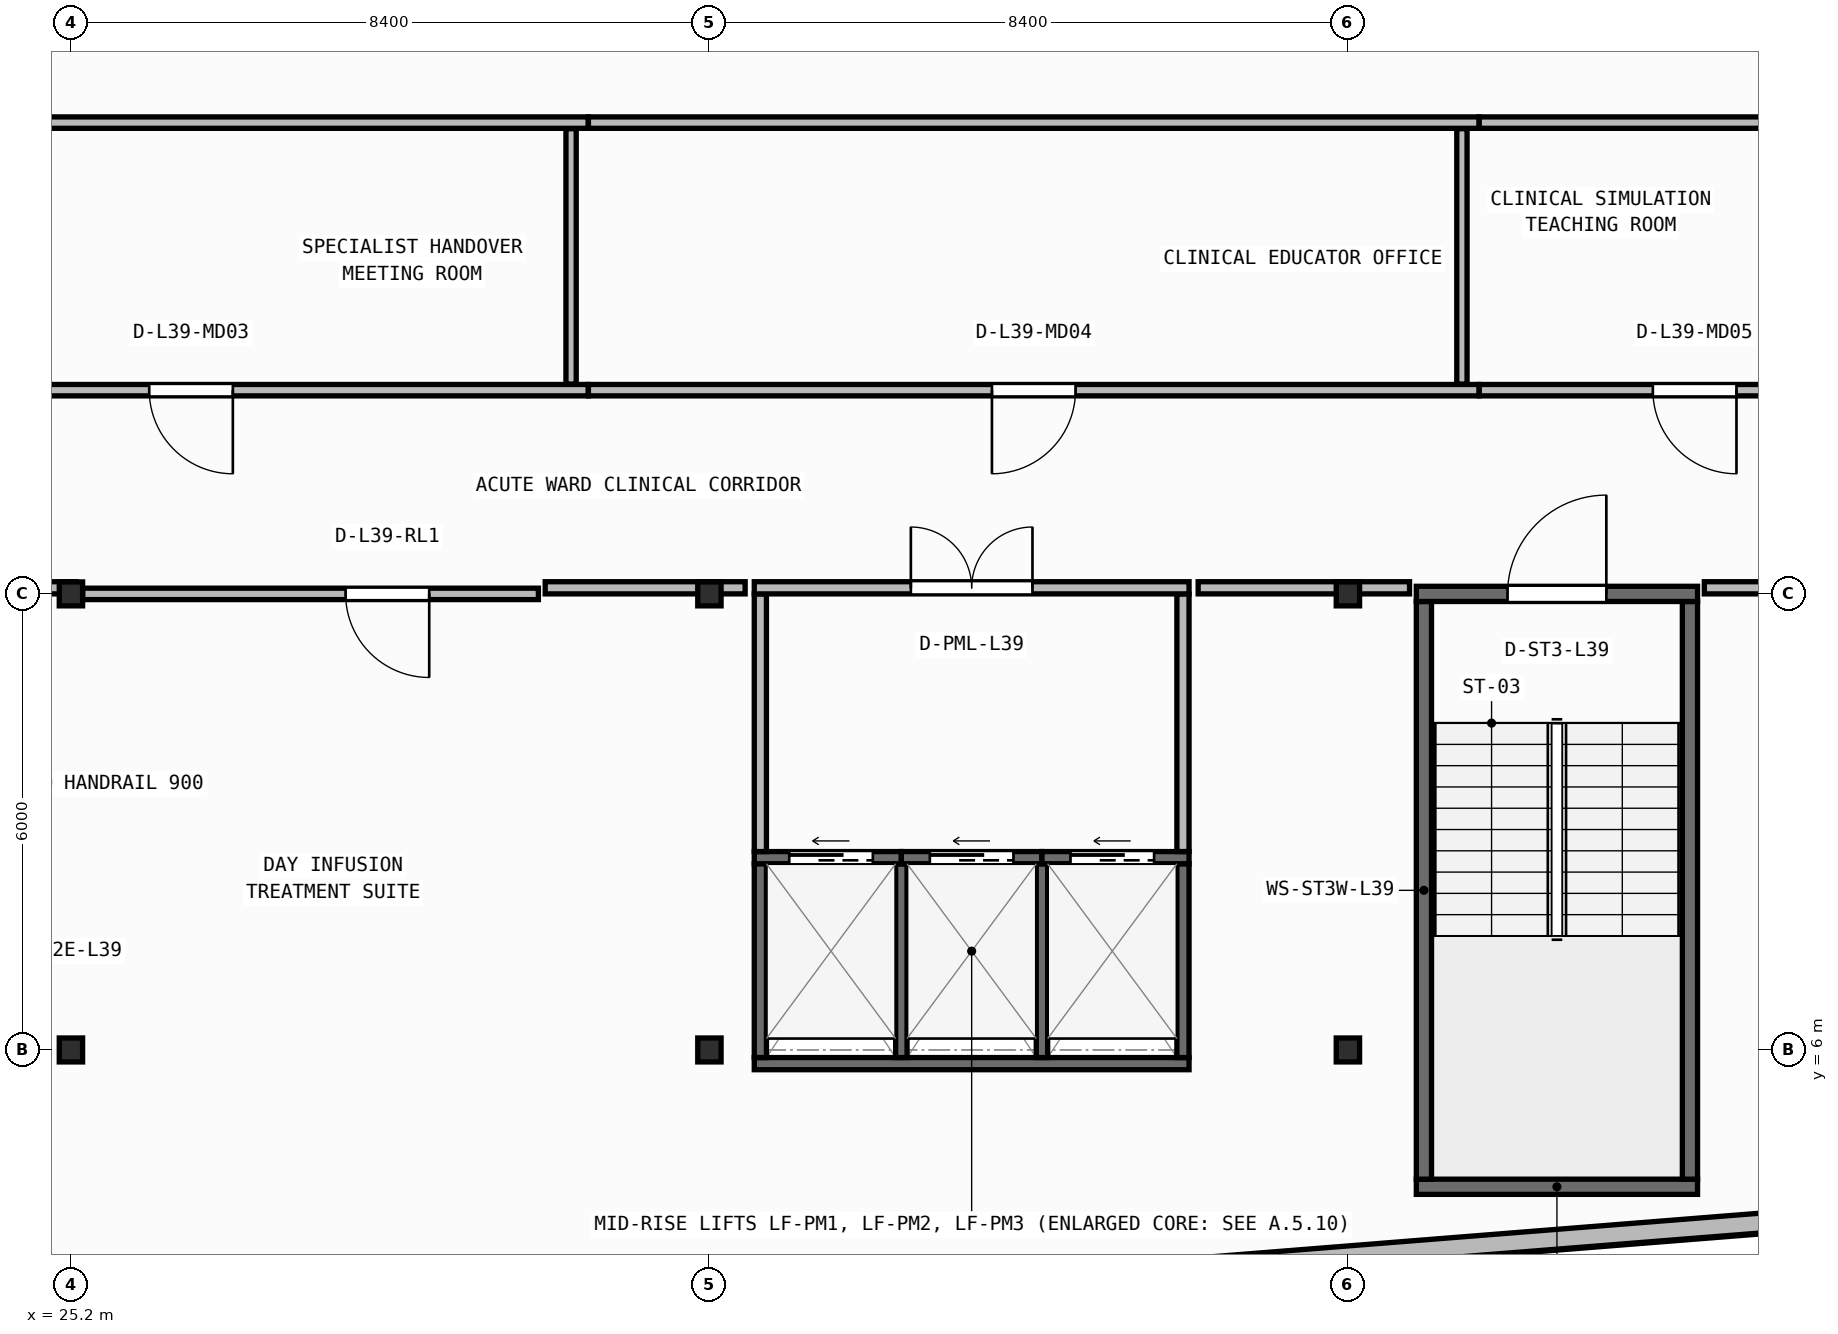
"""IFC4 building model, lengths in metres.
Left out: names, types, materials, properties, quantities, classifications, styles, units other than length and angle.
Written with IfcOpenShell. Run it as: python <this file> out.ifc"""

import sys

from ifc_helpers import new_model, si_unit, direction, frame, frame_2d, origin, origin_2d, place, context, subcontext, project, spatial, rectangle, i_section, extrude, element, fill, save


model = new_model("IFC4")
c1 = context("Model", 3, precision=1e-05, world=origin(), true_north=direction((0.0, 1.0)))
c2 = subcontext(c1, "Body", "Model", "MODEL_VIEW")
j1 = project(units=[si_unit("LENGTHUNIT", "METRE"), si_unit("PLANEANGLEUNIT", "RADIAN")], contexts=[c1])
p1 = place(None, origin())
s1 = spatial("IfcSite", under=j1, at=p1, CompositionType="ELEMENT")
p2 = place(p1, origin())
s2 = spatial("IfcBuilding", under=s1, at=p2, CompositionType="ELEMENT")
p3 = place(p2, frame((0.0, 0.0, 158.65)))
s3 = spatial("IfcBuildingStorey", under=s2, at=p3, CompositionType="ELEMENT", Elevation=158.65)
for number, where, z_axis, x_axis in (
    (1, (25.2, 6.0, 0.0), (0.0, 0.0, 1.0), (1.0, 0.0, 0.0)),
    (2, (33.6, 6.0, 0.0), (0.0, 0.0, 1.0), (1.0, 0.0, 0.0)),
    (3, (42.0, 6.0, 0.0), (0.0, 0.0, 1.0), (1.0, 0.0, 0.0)),
    (4, (25.2, 12.0, 0.0), (0.0, 0.0, 1.0), (1.0, 0.0, 0.0)),
    (5, (33.6, 12.0, 0.0), (0.0, 0.0, 1.0), (1.0, 0.0, 0.0)),
    (6, (42.0, 12.0, 0.0), (0.0, 0.0, 1.0), (1.0, 0.0, 0.0)),
):
    element("IfcColumn", number, at=place(p3, frame(where, z_axis=z_axis, x_axis=x_axis)), inside=s3, PredefinedType="COLUMN", context=c2, shape_type="SweptSolid", body=[
        extrude(i_section(OverallWidth=0.307, OverallDepth=0.315, WebThickness=0.012, FlangeThickness=0.019, FilletRadius=0.017, at=origin_2d()), origin(), (0.0, 0.0, 1.0), 3.95),
    ])
p4 = place(p3, frame((2.76, 0.173, 0.0), z_axis=(0.0, 0.0, 1.0), x_axis=(0.996857931723, 0.079210251617, 0.0)))
e7 = element("IfcWall", 7, at=p4, inside=s3, PredefinedType="STANDARD", context=c2, shape_type="SweptSolid", body=[
    extrude(rectangle(XDim=51.442, YDim=0.26, at=frame_2d((25.721, 0.0))), origin(), (0.0, 0.0, 1.0), 3.71),
])
p5 = place(p4, frame((24.521, 0.0, 0.9)))
e8 = element("IfcOpeningElement", 8, at=p5, cuts=e7, PredefinedType="OPENING", context=c2, shape_type="SweptSolid", body=[
    extrude(rectangle(XDim=2.4, YDim=1.65, at=frame_2d((1.2, 0.825))), frame((0.0, 0.14, 0.0), z_axis=(0.0, -1.0, 0.0), x_axis=(1.0, 0.0, 0.0)), (0.0, 0.0, 1.0), 0.28),
])
p6 = place(p3, frame((42.9, 4.2, 0.0), z_axis=(0.0, 0.0, 1.0), x_axis=(1.0, 0.0, 0.0)))
e9 = element("IfcWall", 9, at=p6, inside=s3, PredefinedType="SHEAR", context=c2, shape_type="SweptSolid", body=[
    extrude(rectangle(XDim=3.7, YDim=0.2, at=frame_2d((1.85, 0.0))), origin(), (0.0, 0.0, 1.0), 3.71),
])
for number, where, z_axis, x_axis in (
    (10, (43.0, 4.3, 0.0), (0.0, 0.0, 1.0), (0.0, 1.0, 0.0)),
    (11, (46.5, 4.3, 0.0), (0.0, 0.0, 1.0), (0.0, 1.0, 0.0)),
):
    element("IfcWall", number, at=place(p3, frame(where, z_axis=z_axis, x_axis=x_axis)), inside=s3, PredefinedType="SHEAR", context=c2, shape_type="SweptSolid", body=[
        extrude(rectangle(XDim=7.6, YDim=0.2, at=frame_2d((3.8, 0.0))), origin(), (0.0, 0.0, 1.0), 3.71),
    ])
p7 = place(p3, frame((42.9, 12.0, 0.0), z_axis=(0.0, 0.0, 1.0), x_axis=(1.0, 0.0, 0.0)))
e12 = element("IfcWall", 12, at=p7, inside=s3, PredefinedType="SHEAR", context=c2, shape_type="SweptSolid", body=[
    extrude(rectangle(XDim=3.7, YDim=0.2, at=frame_2d((1.85, 0.0))), origin(), (0.0, 0.0, 1.0), 3.71),
])
p8 = place(p7, frame((1.2, 0.0, 0.0)))
e13 = element("IfcOpeningElement", 13, at=p8, cuts=e12, PredefinedType="OPENING", context=c2, shape_type="SweptSolid", body=[
    extrude(rectangle(XDim=1.3, YDim=2.15, at=frame_2d((0.65, 1.075))), frame((0.0, 0.11, 0.0), z_axis=(0.0, -1.0, 0.0), x_axis=(1.0, 0.0, 0.0)), (0.0, 0.0, 1.0), 0.22),
])
p9 = place(p3, frame((34.19, 5.82, 0.0), z_axis=(0.0, 0.0, 1.0), x_axis=(1.0, 0.0, 0.0)))
e14 = element("IfcWall", 14, at=p9, inside=s3, PredefinedType="SHEAR", context=c2, shape_type="SweptSolid", body=[
    extrude(rectangle(XDim=5.72, YDim=0.16, at=frame_2d((2.86, 0.0))), origin(), (0.0, 0.0, 1.0), 3.71),
])
for number, where, z_axis, x_axis in (
    (15, (34.27, 5.9, 0.0), (0.0, 0.0, 1.0), (0.0, 1.0, 0.0)),
    (16, (39.83, 5.9, 0.0), (0.0, 0.0, 1.0), (0.0, 1.0, 0.0)),
):
    element("IfcWall", number, at=place(p3, frame(where, z_axis=z_axis, x_axis=x_axis)), inside=s3, PredefinedType="SHEAR", context=c2, shape_type="SweptSolid", body=[
        extrude(rectangle(XDim=2.55, YDim=0.16, at=frame_2d((1.275, 0.0))), origin(), (0.0, 0.0, 1.0), 3.71),
    ])
for number, where, z_axis, x_axis in (
    (17, (36.125, 5.9, 0.0), (0.0, 0.0, 1.0), (0.0, 1.0, 0.0)),
    (18, (37.975, 5.9, 0.0), (0.0, 0.0, 1.0), (0.0, 1.0, 0.0)),
):
    element("IfcWall", number, at=place(p3, frame(where, z_axis=z_axis, x_axis=x_axis)), inside=s3, PredefinedType="SHEAR", context=c2, shape_type="SweptSolid", body=[
        extrude(rectangle(XDim=2.55, YDim=0.15, at=frame_2d((1.275, 0.0))), origin(), (0.0, 0.0, 1.0), 3.71),
    ])
p10 = place(p3, frame((34.19, 8.53, 0.0), z_axis=(0.0, 0.0, 1.0), x_axis=(1.0, 0.0, 0.0)))
e19 = element("IfcWall", 19, at=p10, inside=s3, PredefinedType="SHEAR", context=c2, shape_type="SweptSolid", body=[
    extrude(rectangle(XDim=1.935, YDim=0.16, at=frame_2d((0.968, 0.0))), origin(), (0.0, 0.0, 1.0), 3.71),
])
p11 = place(p10, frame((0.46, 0.0, 0.0)))
e20 = element("IfcOpeningElement", 20, at=p11, cuts=e19, PredefinedType="OPENING", context=c2, shape_type="SweptSolid", body=[
    extrude(rectangle(XDim=1.1, YDim=2.15, at=frame_2d((0.55, 1.075))), frame((0.0, 0.09, 0.0), z_axis=(0.0, -1.0, 0.0), x_axis=(1.0, 0.0, 0.0)), (0.0, 0.0, 1.0), 0.18),
])
p12 = place(p3, frame((36.125, 8.53, 0.0), z_axis=(0.0, 0.0, 1.0), x_axis=(1.0, 0.0, 0.0)))
e21 = element("IfcWall", 21, at=p12, inside=s3, PredefinedType="SHEAR", context=c2, shape_type="SweptSolid", body=[
    extrude(rectangle(XDim=1.85, YDim=0.16, at=frame_2d((0.925, 0.0))), origin(), (0.0, 0.0, 1.0), 3.71),
])
p13 = place(p12, frame((0.375, 0.0, 0.0)))
e22 = element("IfcOpeningElement", 22, at=p13, cuts=e21, PredefinedType="OPENING", context=c2, shape_type="SweptSolid", body=[
    extrude(rectangle(XDim=1.1, YDim=2.15, at=frame_2d((0.55, 1.075))), frame((0.0, 0.09, 0.0), z_axis=(0.0, -1.0, 0.0), x_axis=(1.0, 0.0, 0.0)), (0.0, 0.0, 1.0), 0.18),
])
p14 = place(p3, frame((37.975, 8.53, 0.0), z_axis=(0.0, 0.0, 1.0), x_axis=(1.0, 0.0, 0.0)))
e23 = element("IfcWall", 23, at=p14, inside=s3, PredefinedType="SHEAR", context=c2, shape_type="SweptSolid", body=[
    extrude(rectangle(XDim=1.935, YDim=0.16, at=frame_2d((0.967, 0.0))), origin(), (0.0, 0.0, 1.0), 3.71),
])
p15 = place(p14, frame((0.375, 0.0, 0.0)))
e24 = element("IfcOpeningElement", 24, at=p15, cuts=e23, PredefinedType="OPENING", context=c2, shape_type="SweptSolid", body=[
    extrude(rectangle(XDim=1.1, YDim=2.15, at=frame_2d((0.55, 1.075))), frame((0.0, 0.09, 0.0), z_axis=(0.0, -1.0, 0.0), x_axis=(1.0, 0.0, 0.0)), (0.0, 0.0, 1.0), 0.18),
])
for number, where, z_axis, x_axis in (
    (25, (34.27, 8.61, 0.0), (0.0, 0.0, 1.0), (0.0, 1.0, 0.0)),
    (26, (39.83, 8.61, 0.0), (0.0, 0.0, 1.0), (0.0, 1.0, 0.0)),
):
    element("IfcWall", number, at=place(p3, frame(where, z_axis=z_axis, x_axis=x_axis)), inside=s3, PredefinedType="PARTITIONING", context=c2, shape_type="SweptSolid", body=[
        extrude(rectangle(XDim=3.39, YDim=0.16, at=frame_2d((1.695, 0.0))), origin(), (0.0, 0.0, 1.0), 3.71),
    ])
p16 = place(p3, frame((34.19, 12.08, 0.0), z_axis=(0.0, 0.0, 1.0), x_axis=(1.0, 0.0, 0.0)))
e27 = element("IfcWall", 27, at=p16, inside=s3, PredefinedType="PARTITIONING", context=c2, shape_type="SweptSolid", body=[
    extrude(rectangle(XDim=5.72, YDim=0.16, at=frame_2d((2.86, 0.0))), origin(), (0.0, 0.0, 1.0), 3.083),
])
p17 = place(p16, frame((2.06, 0.0, 0.0)))
e28 = element("IfcOpeningElement", 28, at=p17, cuts=e27, PredefinedType="OPENING", context=c2, shape_type="SweptSolid", body=[
    extrude(rectangle(XDim=1.6, YDim=2.05, at=frame_2d((0.8, 1.025))), frame((0.0, 0.09, 0.0), z_axis=(0.0, -1.0, 0.0), x_axis=(1.0, 0.0, 0.0)), (0.0, 0.0, 1.0), 0.18),
])
p18 = place(p3, frame((31.35, 12.0, 0.0), z_axis=(0.0, 0.0, 1.0), x_axis=(-1.0, 0.0, 0.0)))
e29 = element("IfcWall", 29, at=p18, inside=s3, PredefinedType="PARTITIONING", context=c2, shape_type="SweptSolid", body=[
    extrude(rectangle(XDim=5.997, YDim=0.15, at=frame_2d((2.998, 0.0))), origin(), (0.0, 0.0, 1.0), 3.083),
])
p19 = place(p18, frame((1.437, 0.0, 0.0)))
e30 = element("IfcOpeningElement", 30, at=p19, cuts=e29, PredefinedType="OPENING", context=c2, shape_type="SweptSolid", body=[
    extrude(rectangle(XDim=1.1, YDim=2.1, at=frame_2d((0.55, 1.05))), frame((0.0, 0.085, 0.0), z_axis=(0.0, -1.0, 0.0), x_axis=(1.0, 0.0, 0.0)), (0.0, 0.0, 1.0), 0.17),
])
p20 = place(p3, frame((32.006, 14.68, 0.0), z_axis=(0.0, 0.0, 1.0), x_axis=(-1.0, 0.0, 0.0)))
e31 = element("IfcWall", 31, at=p20, inside=s3, PredefinedType="PARTITIONING", context=c2, shape_type="SweptSolid", body=[
    extrude(rectangle(XDim=10.452, YDim=0.15, at=frame_2d((5.226, 0.0))), origin(), (0.0, 0.0, 1.0), 3.71),
])
p21 = place(p20, frame((4.676, 0.0, 0.0)))
e32 = element("IfcOpeningElement", 32, at=p21, cuts=e31, PredefinedType="OPENING", context=c2, shape_type="SweptSolid", body=[
    extrude(rectangle(XDim=1.1, YDim=2.1, at=frame_2d((0.55, 1.05))), frame((0.0, 0.085, 0.0), z_axis=(0.0, -1.0, 0.0), x_axis=(1.0, 0.0, 0.0)), (0.0, 0.0, 1.0), 0.17),
])
p22 = place(p3, frame((43.726, 14.68, 0.0), z_axis=(0.0, 0.0, 1.0), x_axis=(-1.0, 0.0, 0.0)))
e33 = element("IfcWall", 33, at=p22, inside=s3, PredefinedType="PARTITIONING", context=c2, shape_type="SweptSolid", body=[
    extrude(rectangle(XDim=11.718, YDim=0.15, at=frame_2d((5.859, 0.0))), origin(), (0.0, 0.0, 1.0), 3.71),
])
p23 = place(p22, frame((5.309, 0.0, 0.0)))
e34 = element("IfcOpeningElement", 34, at=p23, cuts=e33, PredefinedType="OPENING", context=c2, shape_type="SweptSolid", body=[
    extrude(rectangle(XDim=1.1, YDim=2.1, at=frame_2d((0.55, 1.05))), frame((0.0, 0.085, 0.0), z_axis=(0.0, -1.0, 0.0), x_axis=(1.0, 0.0, 0.0)), (0.0, 0.0, 1.0), 0.17),
])
p24 = place(p3, frame((49.396, 14.68, 0.0), z_axis=(0.0, 0.0, 1.0), x_axis=(-1.0, 0.0, 0.0)))
e35 = element("IfcWall", 35, at=p24, inside=s3, PredefinedType="PARTITIONING", context=c2, shape_type="SweptSolid", body=[
    extrude(rectangle(XDim=5.668, YDim=0.15, at=frame_2d((2.834, 0.0))), origin(), (0.0, 0.0, 1.0), 3.71),
])
p25 = place(p24, frame((2.284, 0.0, 0.0)))
e36 = element("IfcOpeningElement", 36, at=p25, cuts=e35, PredefinedType="OPENING", context=c2, shape_type="SweptSolid", body=[
    extrude(rectangle(XDim=1.1, YDim=2.1, at=frame_2d((0.55, 1.05))), frame((0.0, 0.085, 0.0), z_axis=(0.0, -1.0, 0.0), x_axis=(1.0, 0.0, 0.0)), (0.0, 0.0, 1.0), 0.17),
])
p26 = place(p3, frame((21.72, 18.2, 0.0), z_axis=(0.0, 0.0, 1.0), x_axis=(1.0, 0.0, 0.0)))
e37 = element("IfcWall", 37, at=p26, inside=s3, PredefinedType="PARTITIONING", context=c2, shape_type="SweptSolid", body=[
    extrude(rectangle(XDim=10.286, YDim=0.15, at=frame_2d((5.143, 0.0))), origin(), (0.0, 0.0, 1.0), 3.71),
])
p27 = place(p3, frame((32.008, 18.2, 0.0), z_axis=(0.0, 0.0, 1.0), x_axis=(1.0, 0.0, 0.0)))
e38 = element("IfcWall", 38, at=p27, inside=s3, PredefinedType="PARTITIONING", context=c2, shape_type="SweptSolid", body=[
    extrude(rectangle(XDim=11.718, YDim=0.15, at=frame_2d((5.859, 0.0))), origin(), (0.0, 0.0, 1.0), 3.71),
])
p28 = place(p3, frame((43.728, 18.2, 0.0), z_axis=(0.0, 0.0, 1.0), x_axis=(1.0, 0.0, 0.0)))
e39 = element("IfcWall", 39, at=p28, inside=s3, PredefinedType="PARTITIONING", context=c2, shape_type="SweptSolid", body=[
    extrude(rectangle(XDim=5.668, YDim=0.15, at=frame_2d((2.834, 0.0))), origin(), (0.0, 0.0, 1.0), 3.71),
])
for number, where, z_axis, x_axis in (
    (40, (31.78, 14.76, 0.0), (0.0, 0.0, 1.0), (0.0, 1.0, 0.0)),
    (41, (43.5, 14.76, 0.0), (0.0, 0.0, 1.0), (0.0, 1.0, 0.0)),
):
    element("IfcWall", number, at=place(p3, frame(where, z_axis=z_axis, x_axis=x_axis)), inside=s3, PredefinedType="PARTITIONING", context=c2, shape_type="SweptSolid", body=[
        extrude(rectangle(XDim=3.36, YDim=0.135, at=frame_2d((1.68, 0.0))), origin(), (0.0, 0.0, 1.0), 3.71),
    ])
p29 = place(p3, frame((24.02, 12.08, 0.0), z_axis=(0.0, 0.0, 1.0), x_axis=(1.0, 0.0, 0.0)))
e42 = element("IfcWall", 42, at=p29, inside=s3, PredefinedType="PARTITIONING", context=c2, shape_type="SweptSolid", body=[
    extrude(rectangle(XDim=1.244, YDim=0.16, at=frame_2d((0.622, 0.0))), origin(), (0.0, 0.0, 1.0), 3.083),
])
p30 = place(p3, frame((31.439, 12.08, 0.0), z_axis=(0.0, 0.0, 1.0), x_axis=(1.0, 0.0, 0.0)))
e43 = element("IfcWall", 43, at=p30, inside=s3, PredefinedType="PARTITIONING", context=c2, shape_type="SweptSolid", body=[
    extrude(rectangle(XDim=2.631, YDim=0.16, at=frame_2d((1.315, 0.0))), origin(), (0.0, 0.0, 1.0), 3.083),
])
p31 = place(p3, frame((40.03, 12.08, 0.0), z_axis=(0.0, 0.0, 1.0), x_axis=(1.0, 0.0, 0.0)))
e44 = element("IfcWall", 44, at=p31, inside=s3, PredefinedType="PARTITIONING", context=c2, shape_type="SweptSolid", body=[
    extrude(rectangle(XDim=2.781, YDim=0.16, at=frame_2d((1.39, 0.0))), origin(), (0.0, 0.0, 1.0), 3.083),
])
p32 = place(p3, frame((46.689, 12.08, 0.0), z_axis=(0.0, 0.0, 1.0), x_axis=(1.0, 0.0, 0.0)))
e45 = element("IfcWall", 45, at=p32, inside=s3, PredefinedType="PARTITIONING", context=c2, shape_type="SweptSolid", body=[
    extrude(rectangle(XDim=3.011, YDim=0.16, at=frame_2d((1.505, 0.0))), origin(), (0.0, 0.0, 1.0), 3.083),
])
p33 = place(p8, origin())
e46 = element("IfcDoor", 46, at=p33, inside=s3, OperationType="SINGLE_SWING_RIGHT", PredefinedType="DOOR", context=c2, shape_type="SweptSolid", body=[
    extrude(rectangle(XDim=1.3, YDim=2.15, at=frame_2d((0.65, 1.075))), frame((0.0, 0.025, 0.0), z_axis=(0.0, -1.0, 0.0), x_axis=(1.0, 0.0, 0.0)), (0.0, 0.0, 1.0), 0.05),
])
fill(e13, e46)
p34 = place(p11, origin())
e47 = element("IfcDoor", 47, at=p34, inside=s3, OperationType="SLIDING_TO_LEFT", PredefinedType="DOOR", context=c2, shape_type="SweptSolid", body=[
    extrude(rectangle(XDim=1.1, YDim=2.15, at=frame_2d((0.55, 1.075))), frame((0.0, 0.025, 0.0), z_axis=(0.0, -1.0, 0.0), x_axis=(1.0, 0.0, 0.0)), (0.0, 0.0, 1.0), 0.05),
])
fill(e20, e47)
p35 = place(p13, origin())
e48 = element("IfcDoor", 48, at=p35, inside=s3, OperationType="SLIDING_TO_LEFT", PredefinedType="DOOR", context=c2, shape_type="SweptSolid", body=[
    extrude(rectangle(XDim=1.1, YDim=2.15, at=frame_2d((0.55, 1.075))), frame((0.0, 0.025, 0.0), z_axis=(0.0, -1.0, 0.0), x_axis=(1.0, 0.0, 0.0)), (0.0, 0.0, 1.0), 0.05),
])
fill(e22, e48)
p36 = place(p15, origin())
e49 = element("IfcDoor", 49, at=p36, inside=s3, OperationType="SLIDING_TO_LEFT", PredefinedType="DOOR", context=c2, shape_type="SweptSolid", body=[
    extrude(rectangle(XDim=1.1, YDim=2.15, at=frame_2d((0.55, 1.075))), frame((0.0, 0.025, 0.0), z_axis=(0.0, -1.0, 0.0), x_axis=(1.0, 0.0, 0.0)), (0.0, 0.0, 1.0), 0.05),
])
fill(e24, e49)
p37 = place(p17, origin())
e50 = element("IfcDoor", 50, at=p37, inside=s3, OperationType="DOUBLE_DOOR_SINGLE_SWING", PredefinedType="DOOR", context=c2, shape_type="SweptSolid", body=[
    extrude(rectangle(XDim=1.6, YDim=2.05, at=frame_2d((0.8, 1.025))), frame((0.0, 0.025, 0.0), z_axis=(0.0, -1.0, 0.0), x_axis=(1.0, 0.0, 0.0)), (0.0, 0.0, 1.0), 0.05),
])
fill(e28, e50)
p38 = place(p19, origin())
e51 = element("IfcDoor", 51, at=p38, inside=s3, OperationType="SINGLE_SWING_LEFT", PredefinedType="DOOR", context=c2, shape_type="SweptSolid", body=[
    extrude(rectangle(XDim=1.1, YDim=2.1, at=frame_2d((0.55, 1.05))), frame((0.0, 0.025, 0.0), z_axis=(0.0, -1.0, 0.0), x_axis=(1.0, 0.0, 0.0)), (0.0, 0.0, 1.0), 0.05),
])
fill(e30, e51)
p39 = place(p21, origin())
e52 = element("IfcDoor", 52, at=p39, inside=s3, OperationType="SINGLE_SWING_LEFT", PredefinedType="DOOR", context=c2, shape_type="SweptSolid", body=[
    extrude(rectangle(XDim=1.1, YDim=2.1, at=frame_2d((0.55, 1.05))), frame((0.0, 0.025, 0.0), z_axis=(0.0, -1.0, 0.0), x_axis=(1.0, 0.0, 0.0)), (0.0, 0.0, 1.0), 0.05),
])
fill(e32, e52)
p40 = place(p23, origin())
e53 = element("IfcDoor", 53, at=p40, inside=s3, OperationType="SINGLE_SWING_RIGHT", PredefinedType="DOOR", context=c2, shape_type="SweptSolid", body=[
    extrude(rectangle(XDim=1.1, YDim=2.1, at=frame_2d((0.55, 1.05))), frame((0.0, 0.025, 0.0), z_axis=(0.0, -1.0, 0.0), x_axis=(1.0, 0.0, 0.0)), (0.0, 0.0, 1.0), 0.05),
])
fill(e34, e53)
p41 = place(p25, origin())
e54 = element("IfcDoor", 54, at=p41, inside=s3, OperationType="SINGLE_SWING_LEFT", PredefinedType="DOOR", context=c2, shape_type="SweptSolid", body=[
    extrude(rectangle(XDim=1.1, YDim=2.1, at=frame_2d((0.55, 1.05))), frame((0.0, 0.025, 0.0), z_axis=(0.0, -1.0, 0.0), x_axis=(1.0, 0.0, 0.0)), (0.0, 0.0, 1.0), 0.05),
])
fill(e36, e54)
save(model, sys.argv[1])
